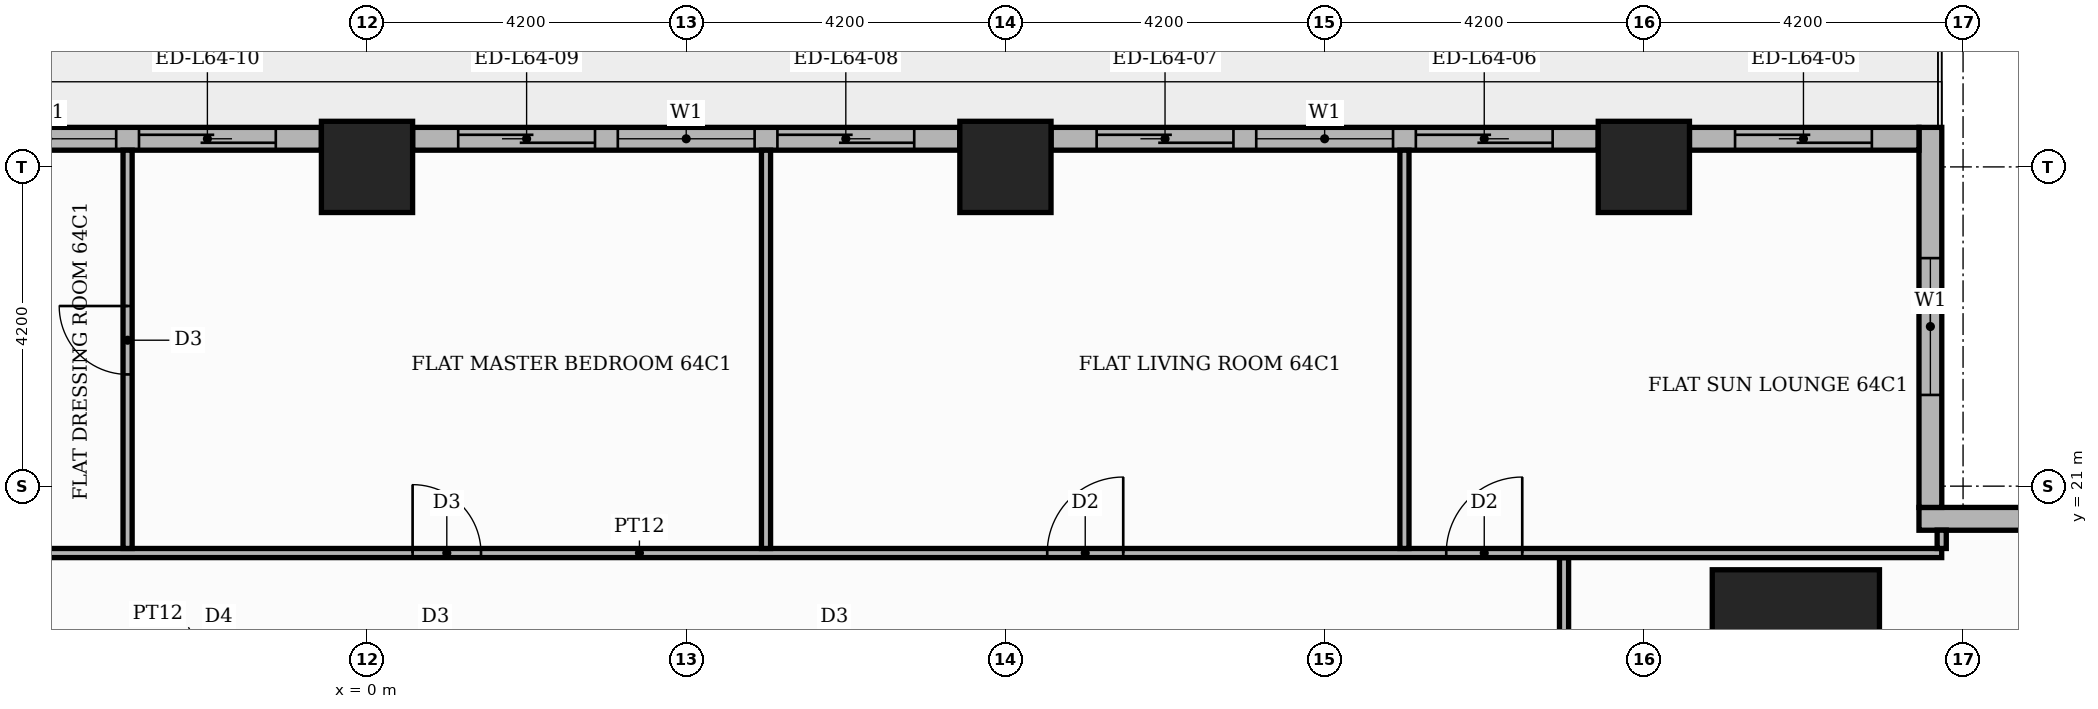
"""IFC4 building model, lengths in metres.
Left out: names, types, materials, properties, quantities, classifications, styles, units other than length and angle.
Written with IfcOpenShell. Run it as: python <this file> out.ifc"""

import sys

from ifc_helpers import new_model, si_unit, direction, frame, frame_2d, origin, origin_2d, place, context, subcontext, project, spatial, rectangle, extrude, element, fill, save


model = new_model("IFC4")
c1 = context("Model", 3, precision=1e-05, world=origin(), true_north=direction((0.0, 1.0)))
c2 = subcontext(c1, "Body", "Model", "MODEL_VIEW")
j1 = project(units=[si_unit("LENGTHUNIT", "METRE"), si_unit("PLANEANGLEUNIT", "RADIAN")], contexts=[c1])
p1 = place(None, origin())
s1 = spatial("IfcSite", under=j1, at=p1, CompositionType="ELEMENT")
p2 = place(p1, origin())
s2 = spatial("IfcBuilding", under=s1, at=p2, CompositionType="ELEMENT")
p3 = place(p2, frame((0.0, 0.0, 267.9)))
s3 = spatial("IfcBuildingStorey", under=s2, at=p3, CompositionType="ELEMENT", Elevation=267.9)
p4 = place(p3, frame((18.8, 18.8, 0.0), z_axis=(0.0, 0.0, 1.0), x_axis=(1.0, 0.0, 0.0)))
e1 = element("IfcColumn", 1, at=p4, inside=s3, PredefinedType="COLUMN", context=c2, shape_type="SweptSolid", body=[
    extrude(rectangle(XDim=2.2, YDim=2.2, at=origin_2d()), origin(), (0.0, 0.0, 1.0), 3.9),
])
for number, where, z_axis, x_axis in (
    (2, (0.0, 25.2, 0.0), (0.0, 0.0, 1.0), (1.0, 0.0, 0.0)),
    (3, (8.4, 25.2, 0.0), (0.0, 0.0, 1.0), (1.0, 0.0, 0.0)),
    (4, (16.8, 25.2, 0.0), (0.0, 0.0, 1.0), (1.0, 0.0, 0.0)),
):
    element("IfcColumn", number, at=place(p3, frame(where, z_axis=z_axis, x_axis=x_axis)), inside=s3, PredefinedType="COLUMN", context=c2, shape_type="SweptSolid", body=[
        extrude(rectangle(XDim=1.2, YDim=1.2, at=origin_2d()), origin(), (0.0, 0.0, 1.0), 3.9),
    ])
p5 = place(p3, frame((25.42, 20.57, 0.0), z_axis=(0.0, 0.0, 1.0), x_axis=(-1.0, 0.0, 0.0)))
e5 = element("IfcWall", 5, at=p5, inside=s3, PredefinedType="STANDARD", context=c2, shape_type="SweptSolid", body=[
    extrude(rectangle(XDim=5.0, YDim=0.3, at=frame_2d((2.5, 0.0))), origin(), (0.0, 0.0, 1.0), 3.48),
])
p6 = place(p5, frame((1.42, 0.0, 0.9)))
e6 = element("IfcOpeningElement", 6, at=p6, cuts=e5, PredefinedType="OPENING", context=c2, shape_type="SweptSolid", body=[
    extrude(rectangle(XDim=1.8, YDim=2.1, at=frame_2d((0.9, 1.05))), frame((0.0, 0.16, 0.0), z_axis=(0.0, -1.0, 0.0), x_axis=(1.0, 0.0, 0.0)), (0.0, 0.0, 1.0), 0.32),
])
p7 = place(p3, frame((20.57, 20.72, 0.0), z_axis=(0.0, 0.0, 1.0), x_axis=(0.0, 1.0, 0.0)))
e7 = element("IfcWall", 7, at=p7, inside=s3, PredefinedType="STANDARD", context=c2, shape_type="SweptSolid", body=[
    extrude(rectangle(XDim=5.0, YDim=0.3, at=frame_2d((2.5, 0.0))), origin(), (0.0, 0.0, 1.0), 3.48),
])
p8 = place(p7, frame((1.48, 0.0, 0.9)))
e8 = element("IfcOpeningElement", 8, at=p8, cuts=e7, PredefinedType="OPENING", context=c2, shape_type="SweptSolid", body=[
    extrude(rectangle(XDim=1.8, YDim=2.1, at=frame_2d((0.9, 1.05))), frame((0.0, 0.16, 0.0), z_axis=(0.0, -1.0, 0.0), x_axis=(1.0, 0.0, 0.0)), (0.0, 0.0, 1.0), 0.32),
])
p9 = place(p3, frame((20.42, 25.57, 0.0), z_axis=(0.0, 0.0, 1.0), x_axis=(-1.0, 0.0, 0.0)))
e9 = element("IfcWall", 9, at=p9, inside=s3, PredefinedType="STANDARD", context=c2, shape_type="SweptSolid", body=[
    extrude(rectangle(XDim=3.02, YDim=0.3, at=frame_2d((1.51, 0.0))), origin(), (0.0, 0.0, 1.0), 3.48),
])
p10 = place(p9, frame((0.62, 0.0, 0.0)))
e10 = element("IfcOpeningElement", 10, at=p10, cuts=e9, PredefinedType="OPENING", context=c2, shape_type="SweptSolid", body=[
    extrude(rectangle(XDim=1.8, YDim=2.4, at=frame_2d((0.9, 1.2))), frame((0.0, 0.16, 0.0), z_axis=(0.0, -1.0, 0.0), x_axis=(1.0, 0.0, 0.0)), (0.0, 0.0, 1.0), 0.32),
])
p11 = place(p3, frame((16.2, 25.57, 0.0), z_axis=(0.0, 0.0, 1.0), x_axis=(-1.0, 0.0, 0.0)))
e11 = element("IfcWall", 11, at=p11, inside=s3, PredefinedType="STANDARD", context=c2, shape_type="SweptSolid", body=[
    extrude(rectangle(XDim=7.2, YDim=0.3, at=frame_2d((3.6, 0.0))), origin(), (0.0, 0.0, 1.0), 3.48),
])
p12 = place(p11, frame((0.6, 0.0, 0.0)))
e12 = element("IfcOpeningElement", 12, at=p12, cuts=e11, PredefinedType="OPENING", context=c2, shape_type="SweptSolid", body=[
    extrude(rectangle(XDim=1.8, YDim=2.4, at=frame_2d((0.9, 1.2))), frame((0.0, 0.16, 0.0), z_axis=(0.0, -1.0, 0.0), x_axis=(1.0, 0.0, 0.0)), (0.0, 0.0, 1.0), 0.32),
])
p13 = place(p11, frame((2.7, 0.0, 0.9)))
e13 = element("IfcOpeningElement", 13, at=p13, cuts=e11, PredefinedType="OPENING", context=c2, shape_type="SweptSolid", body=[
    extrude(rectangle(XDim=1.8, YDim=2.1, at=frame_2d((0.9, 1.05))), frame((0.0, 0.16, 0.0), z_axis=(0.0, -1.0, 0.0), x_axis=(1.0, 0.0, 0.0)), (0.0, 0.0, 1.0), 0.32),
])
p14 = place(p11, frame((4.8, 0.0, 0.0)))
e14 = element("IfcOpeningElement", 14, at=p14, cuts=e11, PredefinedType="OPENING", context=c2, shape_type="SweptSolid", body=[
    extrude(rectangle(XDim=1.8, YDim=2.4, at=frame_2d((0.9, 1.2))), frame((0.0, 0.16, 0.0), z_axis=(0.0, -1.0, 0.0), x_axis=(1.0, 0.0, 0.0)), (0.0, 0.0, 1.0), 0.32),
])
p15 = place(p3, frame((7.8, 25.57, 0.0), z_axis=(0.0, 0.0, 1.0), x_axis=(-1.0, 0.0, 0.0)))
e15 = element("IfcWall", 15, at=p15, inside=s3, PredefinedType="STANDARD", context=c2, shape_type="SweptSolid", body=[
    extrude(rectangle(XDim=7.2, YDim=0.3, at=frame_2d((3.6, 0.0))), origin(), (0.0, 0.0, 1.0), 3.48),
])
p16 = place(p15, frame((0.6, 0.0, 0.0)))
e16 = element("IfcOpeningElement", 16, at=p16, cuts=e15, PredefinedType="OPENING", context=c2, shape_type="SweptSolid", body=[
    extrude(rectangle(XDim=1.8, YDim=2.4, at=frame_2d((0.9, 1.2))), frame((0.0, 0.16, 0.0), z_axis=(0.0, -1.0, 0.0), x_axis=(1.0, 0.0, 0.0)), (0.0, 0.0, 1.0), 0.32),
])
p17 = place(p15, frame((2.7, 0.0, 0.9)))
e17 = element("IfcOpeningElement", 17, at=p17, cuts=e15, PredefinedType="OPENING", context=c2, shape_type="SweptSolid", body=[
    extrude(rectangle(XDim=1.8, YDim=2.1, at=frame_2d((0.9, 1.05))), frame((0.0, 0.16, 0.0), z_axis=(0.0, -1.0, 0.0), x_axis=(1.0, 0.0, 0.0)), (0.0, 0.0, 1.0), 0.32),
])
p18 = place(p15, frame((4.8, 0.0, 0.0)))
e18 = element("IfcOpeningElement", 18, at=p18, cuts=e15, PredefinedType="OPENING", context=c2, shape_type="SweptSolid", body=[
    extrude(rectangle(XDim=1.8, YDim=2.4, at=frame_2d((0.9, 1.2))), frame((0.0, 0.16, 0.0), z_axis=(0.0, -1.0, 0.0), x_axis=(1.0, 0.0, 0.0)), (0.0, 0.0, 1.0), 0.32),
])
p19 = place(p3, frame((-0.6, 25.57, 0.0), z_axis=(0.0, 0.0, 1.0), x_axis=(-1.0, 0.0, 0.0)))
e19 = element("IfcWall", 19, at=p19, inside=s3, PredefinedType="STANDARD", context=c2, shape_type="SweptSolid", body=[
    extrude(rectangle(XDim=7.2, YDim=0.3, at=frame_2d((3.6, 0.0))), origin(), (0.0, 0.0, 1.0), 3.48),
])
p20 = place(p19, frame((0.6, 0.0, 0.0)))
e20 = element("IfcOpeningElement", 20, at=p20, cuts=e19, PredefinedType="OPENING", context=c2, shape_type="SweptSolid", body=[
    extrude(rectangle(XDim=1.8, YDim=2.4, at=frame_2d((0.9, 1.2))), frame((0.0, 0.16, 0.0), z_axis=(0.0, -1.0, 0.0), x_axis=(1.0, 0.0, 0.0)), (0.0, 0.0, 1.0), 0.32),
])
p21 = place(p19, frame((2.7, 0.0, 0.9)))
e21 = element("IfcOpeningElement", 21, at=p21, cuts=e19, PredefinedType="OPENING", context=c2, shape_type="SweptSolid", body=[
    extrude(rectangle(XDim=1.8, YDim=2.1, at=frame_2d((0.9, 1.05))), frame((0.0, 0.16, 0.0), z_axis=(0.0, -1.0, 0.0), x_axis=(1.0, 0.0, 0.0)), (0.0, 0.0, 1.0), 0.32),
])
p22 = place(p19, frame((4.8, 0.0, 0.9)))
e22 = element("IfcOpeningElement", 22, at=p22, cuts=e19, PredefinedType="OPENING", context=c2, shape_type="SweptSolid", body=[
    extrude(rectangle(XDim=1.8, YDim=2.1, at=frame_2d((0.9, 1.05))), frame((0.0, 0.16, 0.0), z_axis=(0.0, -1.0, 0.0), x_axis=(1.0, 0.0, 0.0)), (0.0, 0.0, 1.0), 0.32),
])
p23 = place(p3, frame((15.75, 13.75, 0.0), z_axis=(0.0, 0.0, 1.0), x_axis=(0.0, 1.0, 0.0)))
e23 = element("IfcWall", 23, at=p23, inside=s3, PredefinedType="PARTITIONING", context=c2, shape_type="SweptSolid", body=[
    extrude(rectangle(XDim=6.31, YDim=0.12, at=frame_2d((3.155, 0.0))), origin(), (0.0, 0.0, 1.0), 3.48),
])
p24 = place(p23, frame((2.685, 0.0, 0.0)))
e24 = element("IfcOpeningElement", 24, at=p24, cuts=e23, PredefinedType="OPENING", context=c2, shape_type="SweptSolid", body=[
    extrude(rectangle(XDim=0.9, YDim=2.1, at=frame_2d((0.45, 1.05))), frame((0.0, 0.07, 0.0), z_axis=(0.0, -1.0, 0.0), x_axis=(1.0, 0.0, 0.0)), (0.0, 0.0, 1.0), 0.14),
])
p25 = place(p3, frame((-13.55, 20.12, 0.0), z_axis=(0.0, 0.0, 1.0), x_axis=(1.0, 0.0, 0.0)))
e25 = element("IfcWall", 25, at=p25, inside=s3, PredefinedType="PARTITIONING", context=c2, shape_type="SweptSolid", body=[
    extrude(rectangle(XDim=34.269, YDim=0.12, at=frame_2d((17.135, 0.0))), origin(), (0.0, 0.0, 1.0), 3.48),
])
p26 = place(p25, frame((27.75, 0.0, 0.0)))
e26 = element("IfcOpeningElement", 26, at=p26, cuts=e25, PredefinedType="OPENING", context=c2, shape_type="SweptSolid", body=[
    extrude(rectangle(XDim=1.0, YDim=2.1, at=frame_2d((0.5, 1.05))), frame((0.0, 0.07, 0.0), z_axis=(0.0, -1.0, 0.0), x_axis=(1.0, 0.0, 0.0)), (0.0, 0.0, 1.0), 0.14),
])
p27 = place(p25, frame((22.5, 0.0, 0.0)))
e27 = element("IfcOpeningElement", 27, at=p27, cuts=e25, PredefinedType="OPENING", context=c2, shape_type="SweptSolid", body=[
    extrude(rectangle(XDim=1.0, YDim=2.1, at=frame_2d((0.5, 1.05))), frame((0.0, 0.07, 0.0), z_axis=(0.0, -1.0, 0.0), x_axis=(1.0, 0.0, 0.0)), (0.0, 0.0, 1.0), 0.14),
])
p28 = place(p25, frame((14.15, 0.0, 0.0)))
e28 = element("IfcOpeningElement", 28, at=p28, cuts=e25, PredefinedType="OPENING", context=c2, shape_type="SweptSolid", body=[
    extrude(rectangle(XDim=0.9, YDim=2.1, at=frame_2d((0.45, 1.05))), frame((0.0, 0.07, 0.0), z_axis=(0.0, -1.0, 0.0), x_axis=(1.0, 0.0, 0.0)), (0.0, 0.0, 1.0), 0.14),
])
p29 = place(p25, frame((3.65, 0.0, 0.0)))
e29 = element("IfcOpeningElement", 29, at=p29, cuts=e25, PredefinedType="OPENING", context=c2, shape_type="SweptSolid", body=[
    extrude(rectangle(XDim=0.9, YDim=2.1, at=frame_2d((0.45, 1.05))), frame((0.0, 0.07, 0.0), z_axis=(0.0, -1.0, 0.0), x_axis=(1.0, 0.0, 0.0)), (0.0, 0.0, 1.0), 0.14),
])
p30 = place(p3, frame((-3.15, 20.18, 0.0), z_axis=(0.0, 0.0, 1.0), x_axis=(0.0, 1.0, 0.0)))
e30 = element("IfcWall", 30, at=p30, inside=s3, PredefinedType="PARTITIONING", context=c2, shape_type="SweptSolid", body=[
    extrude(rectangle(XDim=5.24, YDim=0.12, at=frame_2d((2.62, 0.0))), origin(), (0.0, 0.0, 1.0), 3.48),
])
p31 = place(p30, frame((2.29, 0.0, 0.0)))
e31 = element("IfcOpeningElement", 31, at=p31, cuts=e30, PredefinedType="OPENING", context=c2, shape_type="SweptSolid", body=[
    extrude(rectangle(XDim=0.9, YDim=2.1, at=frame_2d((0.45, 1.05))), frame((0.0, 0.07, 0.0), z_axis=(0.0, -1.0, 0.0), x_axis=(1.0, 0.0, 0.0)), (0.0, 0.0, 1.0), 0.14),
])
for number, where, z_axis, x_axis in (
    (32, (5.25, 20.18, 0.0), (0.0, 0.0, 1.0), (0.0, 1.0, 0.0)),
    (33, (13.65, 20.18, 0.0), (0.0, 0.0, 1.0), (0.0, 1.0, 0.0)),
):
    element("IfcWall", number, at=place(p3, frame(where, z_axis=z_axis, x_axis=x_axis)), inside=s3, PredefinedType="PARTITIONING", context=c2, shape_type="SweptSolid", body=[
        extrude(rectangle(XDim=5.24, YDim=0.12, at=frame_2d((2.62, 0.0))), origin(), (0.0, 0.0, 1.0), 3.48),
    ])
p32 = place(p3, frame((20.719, 20.18, 0.0), z_axis=(0.0, 0.0, 1.0), x_axis=(0.0, 1.0, 0.0)))
e34 = element("IfcWall", 34, at=p32, inside=s3, PredefinedType="PARTITIONING", context=c2, shape_type="SweptSolid", body=[
    extrude(rectangle(XDim=0.241, YDim=0.12, at=frame_2d((0.121, 0.0))), origin(), (0.0, 0.0, 1.0), 3.48),
])
p33 = place(p8, origin())
e35 = element("IfcWindow", 35, at=p33, inside=s3, PartitioningType="SINGLE_PANEL", PredefinedType="WINDOW", context=c2, shape_type="SweptSolid", body=[
    extrude(rectangle(XDim=1.8, YDim=2.1, at=frame_2d((0.9, 1.05))), frame((0.0, 0.03, 0.0), z_axis=(0.0, -1.0, 0.0), x_axis=(1.0, 0.0, 0.0)), (0.0, 0.0, 1.0), 0.06),
])
fill(e8, e35)
p34 = place(p10, origin())
e36 = element("IfcDoor", 36, at=p34, inside=s3, OperationType="SLIDING_TO_RIGHT", PredefinedType="DOOR", context=c2, shape_type="SweptSolid", body=[
    extrude(rectangle(XDim=1.8, YDim=2.4, at=frame_2d((0.9, 1.2))), frame((0.0, 0.025, 0.0), z_axis=(0.0, -1.0, 0.0), x_axis=(1.0, 0.0, 0.0)), (0.0, 0.0, 1.0), 0.05),
])
fill(e10, e36)
p35 = place(p12, origin())
e37 = element("IfcDoor", 37, at=p35, inside=s3, OperationType="SLIDING_TO_LEFT", PredefinedType="DOOR", context=c2, shape_type="SweptSolid", body=[
    extrude(rectangle(XDim=1.8, YDim=2.4, at=frame_2d((0.9, 1.2))), frame((0.0, 0.025, 0.0), z_axis=(0.0, -1.0, 0.0), x_axis=(1.0, 0.0, 0.0)), (0.0, 0.0, 1.0), 0.05),
])
fill(e12, e37)
p36 = place(p13, origin())
e38 = element("IfcWindow", 38, at=p36, inside=s3, PartitioningType="SINGLE_PANEL", PredefinedType="WINDOW", context=c2, shape_type="SweptSolid", body=[
    extrude(rectangle(XDim=1.8, YDim=2.1, at=frame_2d((0.9, 1.05))), frame((0.0, 0.03, 0.0), z_axis=(0.0, -1.0, 0.0), x_axis=(1.0, 0.0, 0.0)), (0.0, 0.0, 1.0), 0.06),
])
fill(e13, e38)
p37 = place(p14, origin())
e39 = element("IfcDoor", 39, at=p37, inside=s3, OperationType="SLIDING_TO_RIGHT", PredefinedType="DOOR", context=c2, shape_type="SweptSolid", body=[
    extrude(rectangle(XDim=1.8, YDim=2.4, at=frame_2d((0.9, 1.2))), frame((0.0, 0.025, 0.0), z_axis=(0.0, -1.0, 0.0), x_axis=(1.0, 0.0, 0.0)), (0.0, 0.0, 1.0), 0.05),
])
fill(e14, e39)
p38 = place(p16, origin())
e40 = element("IfcDoor", 40, at=p38, inside=s3, OperationType="SLIDING_TO_LEFT", PredefinedType="DOOR", context=c2, shape_type="SweptSolid", body=[
    extrude(rectangle(XDim=1.8, YDim=2.4, at=frame_2d((0.9, 1.2))), frame((0.0, 0.025, 0.0), z_axis=(0.0, -1.0, 0.0), x_axis=(1.0, 0.0, 0.0)), (0.0, 0.0, 1.0), 0.05),
])
fill(e16, e40)
p39 = place(p17, origin())
e41 = element("IfcWindow", 41, at=p39, inside=s3, PartitioningType="SINGLE_PANEL", PredefinedType="WINDOW", context=c2, shape_type="SweptSolid", body=[
    extrude(rectangle(XDim=1.8, YDim=2.1, at=frame_2d((0.9, 1.05))), frame((0.0, 0.03, 0.0), z_axis=(0.0, -1.0, 0.0), x_axis=(1.0, 0.0, 0.0)), (0.0, 0.0, 1.0), 0.06),
])
fill(e17, e41)
p40 = place(p18, origin())
e42 = element("IfcDoor", 42, at=p40, inside=s3, OperationType="SLIDING_TO_RIGHT", PredefinedType="DOOR", context=c2, shape_type="SweptSolid", body=[
    extrude(rectangle(XDim=1.8, YDim=2.4, at=frame_2d((0.9, 1.2))), frame((0.0, 0.025, 0.0), z_axis=(0.0, -1.0, 0.0), x_axis=(1.0, 0.0, 0.0)), (0.0, 0.0, 1.0), 0.05),
])
fill(e18, e42)
p41 = place(p20, origin())
e43 = element("IfcDoor", 43, at=p41, inside=s3, OperationType="SLIDING_TO_LEFT", PredefinedType="DOOR", context=c2, shape_type="SweptSolid", body=[
    extrude(rectangle(XDim=1.8, YDim=2.4, at=frame_2d((0.9, 1.2))), frame((0.0, 0.025, 0.0), z_axis=(0.0, -1.0, 0.0), x_axis=(1.0, 0.0, 0.0)), (0.0, 0.0, 1.0), 0.05),
])
fill(e20, e43)
p42 = place(p21, origin())
e44 = element("IfcWindow", 44, at=p42, inside=s3, PartitioningType="SINGLE_PANEL", PredefinedType="WINDOW", context=c2, shape_type="SweptSolid", body=[
    extrude(rectangle(XDim=1.8, YDim=2.1, at=frame_2d((0.9, 1.05))), frame((0.0, 0.03, 0.0), z_axis=(0.0, -1.0, 0.0), x_axis=(1.0, 0.0, 0.0)), (0.0, 0.0, 1.0), 0.06),
])
fill(e21, e44)
p43 = place(p26, origin())
e45 = element("IfcDoor", 45, at=p43, inside=s3, OperationType="SINGLE_SWING_RIGHT", PredefinedType="DOOR", context=c2, shape_type="SweptSolid", body=[
    extrude(rectangle(XDim=1.0, YDim=2.1, at=frame_2d((0.5, 1.05))), frame((0.0, 0.025, 0.0), z_axis=(0.0, -1.0, 0.0), x_axis=(1.0, 0.0, 0.0)), (0.0, 0.0, 1.0), 0.05),
])
fill(e26, e45)
p44 = place(p27, origin())
e46 = element("IfcDoor", 46, at=p44, inside=s3, OperationType="SINGLE_SWING_RIGHT", PredefinedType="DOOR", context=c2, shape_type="SweptSolid", body=[
    extrude(rectangle(XDim=1.0, YDim=2.1, at=frame_2d((0.5, 1.05))), frame((0.0, 0.025, 0.0), z_axis=(0.0, -1.0, 0.0), x_axis=(1.0, 0.0, 0.0)), (0.0, 0.0, 1.0), 0.05),
])
fill(e27, e46)
p45 = place(p28, origin())
e47 = element("IfcDoor", 47, at=p45, inside=s3, OperationType="SINGLE_SWING_LEFT", PredefinedType="DOOR", context=c2, shape_type="SweptSolid", body=[
    extrude(rectangle(XDim=0.9, YDim=2.1, at=frame_2d((0.45, 1.05))), frame((0.0, 0.025, 0.0), z_axis=(0.0, -1.0, 0.0), x_axis=(1.0, 0.0, 0.0)), (0.0, 0.0, 1.0), 0.05),
])
fill(e28, e47)
p46 = place(p31, origin())
e48 = element("IfcDoor", 48, at=p46, inside=s3, OperationType="SINGLE_SWING_RIGHT", PredefinedType="DOOR", context=c2, shape_type="SweptSolid", body=[
    extrude(rectangle(XDim=0.9, YDim=2.1, at=frame_2d((0.45, 1.05))), frame((0.0, 0.025, 0.0), z_axis=(0.0, -1.0, 0.0), x_axis=(1.0, 0.0, 0.0)), (0.0, 0.0, 1.0), 0.05),
])
fill(e31, e48)
save(model, sys.argv[1])
